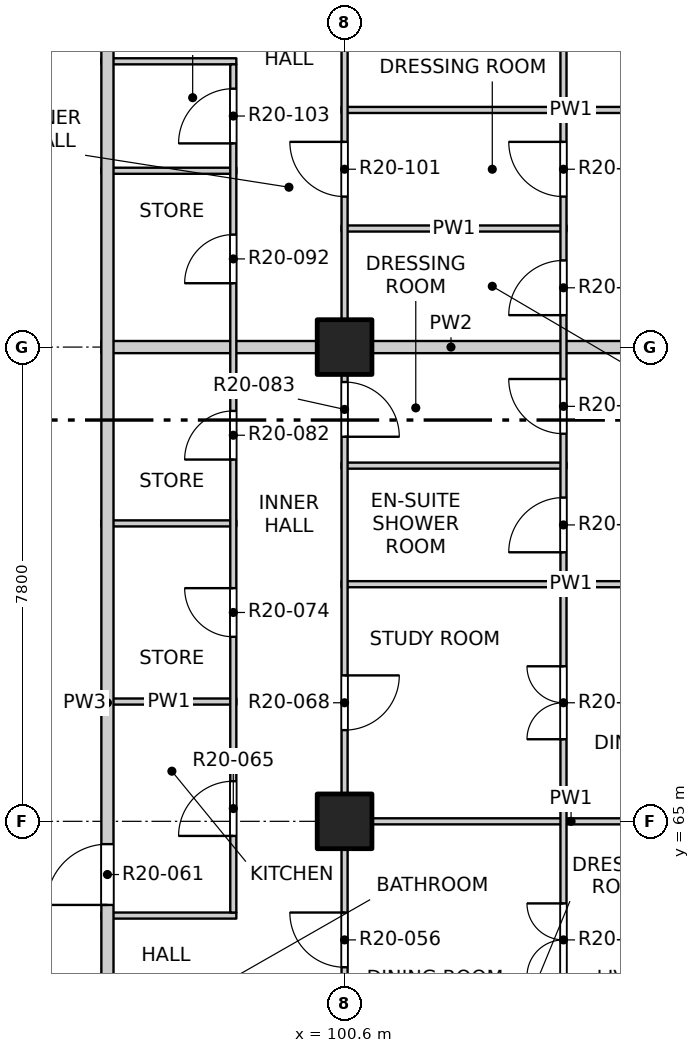
"""IFC4 building model, lengths in metres.
Left out: names, types, materials, properties, quantities, classifications, styles, units other than length and angle.
Written with IfcOpenShell. Run it as: python <this file> out.ifc"""

import sys

from ifc_helpers import new_model, si_unit, direction, frame, frame_2d, origin, origin_2d, place, context, subcontext, project, spatial, rectangle, extrude, element, fill, save


model = new_model("IFC4")
c1 = context("Model", 3, precision=1e-05, world=origin(), true_north=direction((0.0, 1.0)))
c2 = subcontext(c1, "Body", "Model", "MODEL_VIEW")
j1 = project(units=[si_unit("LENGTHUNIT", "METRE"), si_unit("PLANEANGLEUNIT", "RADIAN")], contexts=[c1])
p1 = place(None, origin())
s1 = spatial("IfcSite", under=j1, at=p1, CompositionType="ELEMENT")
p2 = place(p1, origin())
s2 = spatial("IfcBuilding", under=s1, at=p2, CompositionType="ELEMENT")
p3 = place(p2, frame((0.0, 0.0, 210.9)))
s3 = spatial("IfcBuildingStorey", under=s2, at=p3, CompositionType="ELEMENT", Elevation=210.9)
for number, where, z_axis, x_axis in (
    (1, (100.6, 65.0, -0.25), (0.0, 0.0, 1.0), (1.0, 0.0, 0.0)),
    (2, (100.6, 72.8, -0.25), (0.0, 0.0, 1.0), (1.0, 0.0, 0.0)),
):
    element("IfcColumn", number, at=place(p3, frame(where, z_axis=z_axis, x_axis=x_axis)), inside=s3, PredefinedType="COLUMN", context=c2, shape_type="SweptSolid", body=[
        extrude(rectangle(XDim=0.9, YDim=0.9, at=origin_2d()), origin(), (0.0, 0.0, 1.0), 3.4),
    ])
p4 = place(p3, frame((96.6, 63.45, 0.0), z_axis=(0.0, 0.0, 1.0), x_axis=(1.0, 0.0, 0.0)))
e3 = element("IfcWall", 3, at=p4, inside=s3, PredefinedType="PARTITIONING", context=c2, shape_type="SweptSolid", body=[
    extrude(rectangle(XDim=2.22, YDim=0.1, at=frame_2d((1.11, 0.0))), origin(), (0.0, 0.0, 1.0), 3.15),
])
p5 = place(p3, frame((100.55, 65.0, 0.0), z_axis=(0.0, 0.0, 1.0), x_axis=(1.0, 0.0, 0.0)))
e4 = element("IfcWall", 4, at=p5, inside=s3, PredefinedType="PARTITIONING", context=c2, shape_type="SweptSolid", body=[
    extrude(rectangle(XDim=7.55, YDim=0.1, at=frame_2d((3.775, 0.0))), origin(), (0.0, 0.0, 1.0), 3.15),
])
p6 = place(p3, frame((96.6, 66.97, 0.0), z_axis=(0.0, 0.0, 1.0), x_axis=(1.0, 0.0, 0.0)))
e5 = element("IfcWall", 5, at=p6, inside=s3, PredefinedType="PARTITIONING", context=c2, shape_type="SweptSolid", body=[
    extrude(rectangle(XDim=2.22, YDim=0.1, at=frame_2d((1.11, 0.0))), origin(), (0.0, 0.0, 1.0), 3.15),
])
p7 = place(p3, frame((100.55, 68.9, 0.0), z_axis=(0.0, 0.0, 1.0), x_axis=(1.0, 0.0, 0.0)))
e6 = element("IfcWall", 6, at=p7, inside=s3, PredefinedType="PARTITIONING", context=c2, shape_type="SweptSolid", body=[
    extrude(rectangle(XDim=7.55, YDim=0.1, at=frame_2d((3.775, 0.0))), origin(), (0.0, 0.0, 1.0), 2.55),
])
p8 = place(p3, frame((96.6, 69.9, 0.0), z_axis=(0.0, 0.0, 1.0), x_axis=(1.0, 0.0, 0.0)))
e7 = element("IfcWall", 7, at=p8, inside=s3, PredefinedType="PARTITIONING", context=c2, shape_type="SweptSolid", body=[
    extrude(rectangle(XDim=2.22, YDim=0.1, at=frame_2d((1.11, 0.0))), origin(), (0.0, 0.0, 1.0), 3.15),
])
p9 = place(p3, frame((100.55, 70.85, 0.0), z_axis=(0.0, 0.0, 1.0), x_axis=(1.0, 0.0, 0.0)))
e8 = element("IfcWall", 8, at=p9, inside=s3, PredefinedType="PARTITIONING", context=c2, shape_type="SweptSolid", body=[
    extrude(rectangle(XDim=3.7, YDim=0.1, at=frame_2d((1.85, 0.0))), origin(), (0.0, 0.0, 1.0), 3.15),
])
p10 = place(p3, frame((96.6, 72.8, 0.0), z_axis=(0.0, 0.0, 1.0), x_axis=(1.0, 0.0, 0.0)))
e9 = element("IfcWall", 9, at=p10, inside=s3, PredefinedType="PARTITIONING", context=c2, shape_type="SweptSolid", body=[
    extrude(rectangle(XDim=11.5, YDim=0.2, at=frame_2d((5.75, 0.0))), origin(), (0.0, 0.0, 1.0), 3.15),
])
p11 = place(p3, frame((100.55, 74.75, 0.0), z_axis=(0.0, 0.0, 1.0), x_axis=(1.0, 0.0, 0.0)))
e10 = element("IfcWall", 10, at=p11, inside=s3, PredefinedType="PARTITIONING", context=c2, shape_type="SweptSolid", body=[
    extrude(rectangle(XDim=3.7, YDim=0.1, at=frame_2d((1.85, 0.0))), origin(), (0.0, 0.0, 1.0), 3.15),
])
p12 = place(p3, frame((96.6, 75.7, 0.0), z_axis=(0.0, 0.0, 1.0), x_axis=(1.0, 0.0, 0.0)))
e11 = element("IfcWall", 11, at=p12, inside=s3, PredefinedType="PARTITIONING", context=c2, shape_type="SweptSolid", body=[
    extrude(rectangle(XDim=2.22, YDim=0.1, at=frame_2d((1.11, 0.0))), origin(), (0.0, 0.0, 1.0), 3.15),
])
p13 = place(p3, frame((100.55, 76.7, 0.0), z_axis=(0.0, 0.0, 1.0), x_axis=(1.0, 0.0, 0.0)))
e12 = element("IfcWall", 12, at=p13, inside=s3, PredefinedType="PARTITIONING", context=c2, shape_type="SweptSolid", body=[
    extrude(rectangle(XDim=7.55, YDim=0.1, at=frame_2d((3.775, 0.0))), origin(), (0.0, 0.0, 1.0), 2.55),
])
p14 = place(p3, frame((96.6, 77.5, 0.0), z_axis=(0.0, 0.0, 1.0), x_axis=(1.0, 0.0, 0.0)))
e13 = element("IfcWall", 13, at=p14, inside=s3, PredefinedType="PARTITIONING", context=c2, shape_type="SweptSolid", body=[
    extrude(rectangle(XDim=2.22, YDim=0.1, at=frame_2d((1.11, 0.0))), origin(), (0.0, 0.0, 1.0), 3.15),
])
p15 = place(p3, frame((96.7, 49.5, 0.0), z_axis=(0.0, 0.0, 1.0), x_axis=(0.0, 1.0, 0.0)))
e14 = element("IfcWall", 14, at=p15, inside=s3, PredefinedType="PARTITIONING", context=c2, shape_type="SweptSolid", body=[
    extrude(rectangle(XDim=34.9, YDim=0.2, at=frame_2d((17.45, 0.0))), origin(), (0.0, 0.0, 1.0), 3.15),
])
p16 = place(p15, frame((9.625, 0.0, 0.0)))
e15 = element("IfcOpeningElement", 15, at=p16, cuts=e14, PredefinedType="OPENING", context=c2, shape_type="SweptSolid", body=[
    extrude(rectangle(XDim=1.0, YDim=2.1, at=frame_2d((0.5, 1.05))), frame((0.0, 0.11, 0.0), z_axis=(0.0, -1.0, 0.0), x_axis=(1.0, 0.0, 0.0)), (0.0, 0.0, 1.0), 0.22),
])
p17 = place(p15, frame((14.125, 0.0, 0.0)))
e16 = element("IfcOpeningElement", 16, at=p17, cuts=e14, PredefinedType="OPENING", context=c2, shape_type="SweptSolid", body=[
    extrude(rectangle(XDim=1.0, YDim=2.1, at=frame_2d((0.5, 1.05))), frame((0.0, 0.11, 0.0), z_axis=(0.0, -1.0, 0.0), x_axis=(1.0, 0.0, 0.0)), (0.0, 0.0, 1.0), 0.22),
])
p18 = place(p15, frame((29.275, 0.0, 0.0)))
e17 = element("IfcOpeningElement", 17, at=p18, cuts=e14, PredefinedType="OPENING", context=c2, shape_type="SweptSolid", body=[
    extrude(rectangle(XDim=1.0, YDim=2.1, at=frame_2d((0.5, 1.05))), frame((0.0, 0.11, 0.0), z_axis=(0.0, -1.0, 0.0), x_axis=(1.0, 0.0, 0.0)), (0.0, 0.0, 1.0), 0.22),
])
p19 = place(p3, frame((98.77, 63.5, 0.0), z_axis=(0.0, 0.0, 1.0), x_axis=(0.0, 1.0, 0.0)))
e18 = element("IfcWall", 18, at=p19, inside=s3, PredefinedType="PARTITIONING", context=c2, shape_type="SweptSolid", body=[
    extrude(rectangle(XDim=13.95, YDim=0.1, at=frame_2d((6.975, 0.0))), origin(), (0.0, 0.0, 1.0), 3.15),
])
p20 = place(p19, frame((1.26, 0.0, 0.0)))
e19 = element("IfcOpeningElement", 19, at=p20, cuts=e18, PredefinedType="OPENING", context=c2, shape_type="SweptSolid", body=[
    extrude(rectangle(XDim=0.9, YDim=2.1, at=frame_2d((0.45, 1.05))), frame((0.0, 0.06, 0.0), z_axis=(0.0, -1.0, 0.0), x_axis=(1.0, 0.0, 0.0)), (0.0, 0.0, 1.0), 0.12),
])
p21 = place(p19, frame((4.535, 0.0, 0.0)))
e20 = element("IfcOpeningElement", 20, at=p21, cuts=e18, PredefinedType="OPENING", context=c2, shape_type="SweptSolid", body=[
    extrude(rectangle(XDim=0.8, YDim=2.1, at=frame_2d((0.4, 1.05))), frame((0.0, 0.06, 0.0), z_axis=(0.0, -1.0, 0.0), x_axis=(1.0, 0.0, 0.0)), (0.0, 0.0, 1.0), 0.12),
])
p22 = place(p19, frame((7.45, 0.0, 0.0)))
e21 = element("IfcOpeningElement", 21, at=p22, cuts=e18, PredefinedType="OPENING", context=c2, shape_type="SweptSolid", body=[
    extrude(rectangle(XDim=0.8, YDim=2.1, at=frame_2d((0.4, 1.05))), frame((0.0, 0.06, 0.0), z_axis=(0.0, -1.0, 0.0), x_axis=(1.0, 0.0, 0.0)), (0.0, 0.0, 1.0), 0.12),
])
p23 = place(p19, frame((10.35, 0.0, 0.0)))
e22 = element("IfcOpeningElement", 22, at=p23, cuts=e18, PredefinedType="OPENING", context=c2, shape_type="SweptSolid", body=[
    extrude(rectangle(XDim=0.8, YDim=2.1, at=frame_2d((0.4, 1.05))), frame((0.0, 0.06, 0.0), z_axis=(0.0, -1.0, 0.0), x_axis=(1.0, 0.0, 0.0)), (0.0, 0.0, 1.0), 0.12),
])
p24 = place(p19, frame((12.65, 0.0, 0.0)))
e23 = element("IfcOpeningElement", 23, at=p24, cuts=e18, PredefinedType="OPENING", context=c2, shape_type="SweptSolid", body=[
    extrude(rectangle(XDim=0.9, YDim=2.1, at=frame_2d((0.45, 1.05))), frame((0.0, 0.06, 0.0), z_axis=(0.0, -1.0, 0.0), x_axis=(1.0, 0.0, 0.0)), (0.0, 0.0, 1.0), 0.12),
])
p25 = place(p3, frame((100.6, 41.9, 0.0), z_axis=(0.0, 0.0, 1.0), x_axis=(0.0, 1.0, 0.0)))
e24 = element("IfcWall", 24, at=p25, inside=s3, PredefinedType="PARTITIONING", context=c2, shape_type="SweptSolid", body=[
    extrude(rectangle(XDim=46.2, YDim=0.1, at=frame_2d((23.1, 0.0))), origin(), (0.0, 0.0, 1.0), 3.15),
])
p26 = place(p25, frame((1.2, 0.0, 0.0)))
e25 = element("IfcOpeningElement", 25, at=p26, cuts=e24, PredefinedType="OPENING", context=c2, shape_type="SweptSolid", body=[
    extrude(rectangle(XDim=0.9, YDim=2.1, at=frame_2d((0.45, 1.05))), frame((0.0, 0.06, 0.0), z_axis=(0.0, -1.0, 0.0), x_axis=(1.0, 0.0, 0.0)), (0.0, 0.0, 1.0), 0.12),
])
p27 = place(p25, frame((6.025, 0.0, 0.0)))
e26 = element("IfcOpeningElement", 26, at=p27, cuts=e24, PredefinedType="OPENING", context=c2, shape_type="SweptSolid", body=[
    extrude(rectangle(XDim=0.9, YDim=2.1, at=frame_2d((0.45, 1.05))), frame((0.0, 0.06, 0.0), z_axis=(0.0, -1.0, 0.0), x_axis=(1.0, 0.0, 0.0)), (0.0, 0.0, 1.0), 0.12),
])
p28 = place(p25, frame((9.0, 0.0, 0.0)))
e27 = element("IfcOpeningElement", 27, at=p28, cuts=e24, PredefinedType="OPENING", context=c2, shape_type="SweptSolid", body=[
    extrude(rectangle(XDim=0.9, YDim=2.1, at=frame_2d((0.45, 1.05))), frame((0.0, 0.06, 0.0), z_axis=(0.0, -1.0, 0.0), x_axis=(1.0, 0.0, 0.0)), (0.0, 0.0, 1.0), 0.12),
])
p29 = place(p25, frame((13.85, 0.0, 0.0)))
e28 = element("IfcOpeningElement", 28, at=p29, cuts=e24, PredefinedType="OPENING", context=c2, shape_type="SweptSolid", body=[
    extrude(rectangle(XDim=0.9, YDim=2.1, at=frame_2d((0.45, 1.05))), frame((0.0, 0.06, 0.0), z_axis=(0.0, -1.0, 0.0), x_axis=(1.0, 0.0, 0.0)), (0.0, 0.0, 1.0), 0.12),
])
p30 = place(p25, frame((17.775, 0.0, 0.0)))
e29 = element("IfcOpeningElement", 29, at=p30, cuts=e24, PredefinedType="OPENING", context=c2, shape_type="SweptSolid", body=[
    extrude(rectangle(XDim=0.9, YDim=2.1, at=frame_2d((0.45, 1.05))), frame((0.0, 0.06, 0.0), z_axis=(0.0, -1.0, 0.0), x_axis=(1.0, 0.0, 0.0)), (0.0, 0.0, 1.0), 0.12),
])
p31 = place(p25, frame((20.7, 0.0, 0.0)))
e30 = element("IfcOpeningElement", 30, at=p31, cuts=e24, PredefinedType="OPENING", context=c2, shape_type="SweptSolid", body=[
    extrude(rectangle(XDim=0.9, YDim=2.1, at=frame_2d((0.45, 1.05))), frame((0.0, 0.06, 0.0), z_axis=(0.0, -1.0, 0.0), x_axis=(1.0, 0.0, 0.0)), (0.0, 0.0, 1.0), 0.12),
])
p32 = place(p25, frame((24.6, 0.0, 0.0)))
e31 = element("IfcOpeningElement", 31, at=p32, cuts=e24, PredefinedType="OPENING", context=c2, shape_type="SweptSolid", body=[
    extrude(rectangle(XDim=0.9, YDim=2.1, at=frame_2d((0.45, 1.05))), frame((0.0, 0.06, 0.0), z_axis=(0.0, -1.0, 0.0), x_axis=(1.0, 0.0, 0.0)), (0.0, 0.0, 1.0), 0.12),
])
p33 = place(p25, frame((29.425, 0.0, 0.0)))
e32 = element("IfcOpeningElement", 32, at=p33, cuts=e24, PredefinedType="OPENING", context=c2, shape_type="SweptSolid", body=[
    extrude(rectangle(XDim=0.9, YDim=2.1, at=frame_2d((0.45, 1.05))), frame((0.0, 0.06, 0.0), z_axis=(0.0, -1.0, 0.0), x_axis=(1.0, 0.0, 0.0)), (0.0, 0.0, 1.0), 0.12),
])
p34 = place(p25, frame((33.375, 0.0, 0.0)))
e33 = element("IfcOpeningElement", 33, at=p34, cuts=e24, PredefinedType="OPENING", context=c2, shape_type="SweptSolid", body=[
    extrude(rectangle(XDim=0.9, YDim=2.1, at=frame_2d((0.45, 1.05))), frame((0.0, 0.06, 0.0), z_axis=(0.0, -1.0, 0.0), x_axis=(1.0, 0.0, 0.0)), (0.0, 0.0, 1.0), 0.12),
])
p35 = place(p25, frame((36.3, 0.0, 0.0)))
e34 = element("IfcOpeningElement", 34, at=p35, cuts=e24, PredefinedType="OPENING", context=c2, shape_type="SweptSolid", body=[
    extrude(rectangle(XDim=0.9, YDim=2.1, at=frame_2d((0.45, 1.05))), frame((0.0, 0.06, 0.0), z_axis=(0.0, -1.0, 0.0), x_axis=(1.0, 0.0, 0.0)), (0.0, 0.0, 1.0), 0.12),
])
p36 = place(p25, frame((41.175, 0.0, 0.0)))
e35 = element("IfcOpeningElement", 35, at=p36, cuts=e24, PredefinedType="OPENING", context=c2, shape_type="SweptSolid", body=[
    extrude(rectangle(XDim=0.9, YDim=2.1, at=frame_2d((0.45, 1.05))), frame((0.0, 0.06, 0.0), z_axis=(0.0, -1.0, 0.0), x_axis=(1.0, 0.0, 0.0)), (0.0, 0.0, 1.0), 0.12),
])
p37 = place(p25, frame((44.1, 0.0, 0.0)))
e36 = element("IfcOpeningElement", 36, at=p37, cuts=e24, PredefinedType="OPENING", context=c2, shape_type="SweptSolid", body=[
    extrude(rectangle(XDim=0.9, YDim=2.1, at=frame_2d((0.45, 1.05))), frame((0.0, 0.06, 0.0), z_axis=(0.0, -1.0, 0.0), x_axis=(1.0, 0.0, 0.0)), (0.0, 0.0, 1.0), 0.12),
])
p38 = place(p3, frame((104.2, 61.2, 0.0), z_axis=(0.0, 0.0, 1.0), x_axis=(0.0, 1.0, 0.0)))
e37 = element("IfcWall", 37, at=p38, inside=s3, PredefinedType="PARTITIONING", context=c2, shape_type="SweptSolid", body=[
    extrude(rectangle(XDim=26.9, YDim=0.1, at=frame_2d((13.45, 0.0))), origin(), (0.0, 0.0, 1.0), 3.15),
])
p39 = place(p38, frame((1.25, 0.0, 0.0)))
e38 = element("IfcOpeningElement", 38, at=p39, cuts=e37, PredefinedType="OPENING", context=c2, shape_type="SweptSolid", body=[
    extrude(rectangle(XDim=1.2, YDim=2.1, at=frame_2d((0.6, 1.05))), frame((0.0, 0.06, 0.0), z_axis=(0.0, -1.0, 0.0), x_axis=(1.0, 0.0, 0.0)), (0.0, 0.0, 1.0), 0.12),
])
p40 = place(p38, frame((5.15, 0.0, 0.0)))
e39 = element("IfcOpeningElement", 39, at=p40, cuts=e37, PredefinedType="OPENING", context=c2, shape_type="SweptSolid", body=[
    extrude(rectangle(XDim=1.2, YDim=2.1, at=frame_2d((0.6, 1.05))), frame((0.0, 0.06, 0.0), z_axis=(0.0, -1.0, 0.0), x_axis=(1.0, 0.0, 0.0)), (0.0, 0.0, 1.0), 0.12),
])
p41 = place(p38, frame((8.225, 0.0, 0.0)))
e40 = element("IfcOpeningElement", 40, at=p41, cuts=e37, PredefinedType="OPENING", context=c2, shape_type="SweptSolid", body=[
    extrude(rectangle(XDim=0.9, YDim=2.1, at=frame_2d((0.45, 1.05))), frame((0.0, 0.06, 0.0), z_axis=(0.0, -1.0, 0.0), x_axis=(1.0, 0.0, 0.0)), (0.0, 0.0, 1.0), 0.12),
])
p42 = place(p38, frame((10.175, 0.0, 0.0)))
e41 = element("IfcOpeningElement", 41, at=p42, cuts=e37, PredefinedType="OPENING", context=c2, shape_type="SweptSolid", body=[
    extrude(rectangle(XDim=0.9, YDim=2.1, at=frame_2d((0.45, 1.05))), frame((0.0, 0.06, 0.0), z_axis=(0.0, -1.0, 0.0), x_axis=(1.0, 0.0, 0.0)), (0.0, 0.0, 1.0), 0.12),
])
p43 = place(p38, frame((12.125, 0.0, 0.0)))
e42 = element("IfcOpeningElement", 42, at=p43, cuts=e37, PredefinedType="OPENING", context=c2, shape_type="SweptSolid", body=[
    extrude(rectangle(XDim=0.9, YDim=2.1, at=frame_2d((0.45, 1.05))), frame((0.0, 0.06, 0.0), z_axis=(0.0, -1.0, 0.0), x_axis=(1.0, 0.0, 0.0)), (0.0, 0.0, 1.0), 0.12),
])
p44 = place(p38, frame((14.075, 0.0, 0.0)))
e43 = element("IfcOpeningElement", 43, at=p44, cuts=e37, PredefinedType="OPENING", context=c2, shape_type="SweptSolid", body=[
    extrude(rectangle(XDim=0.9, YDim=2.1, at=frame_2d((0.45, 1.05))), frame((0.0, 0.06, 0.0), z_axis=(0.0, -1.0, 0.0), x_axis=(1.0, 0.0, 0.0)), (0.0, 0.0, 1.0), 0.12),
])
p45 = place(p38, frame((16.85, 0.0, 0.0)))
e44 = element("IfcOpeningElement", 44, at=p45, cuts=e37, PredefinedType="OPENING", context=c2, shape_type="SweptSolid", body=[
    extrude(rectangle(XDim=1.2, YDim=2.1, at=frame_2d((0.6, 1.05))), frame((0.0, 0.06, 0.0), z_axis=(0.0, -1.0, 0.0), x_axis=(1.0, 0.0, 0.0)), (0.0, 0.0, 1.0), 0.12),
])
p46 = place(p38, frame((19.925, 0.0, 0.0)))
e45 = element("IfcOpeningElement", 45, at=p46, cuts=e37, PredefinedType="OPENING", context=c2, shape_type="SweptSolid", body=[
    extrude(rectangle(XDim=0.9, YDim=2.1, at=frame_2d((0.45, 1.05))), frame((0.0, 0.06, 0.0), z_axis=(0.0, -1.0, 0.0), x_axis=(1.0, 0.0, 0.0)), (0.0, 0.0, 1.0), 0.12),
])
p47 = place(p38, frame((21.875, 0.0, 0.0)))
e46 = element("IfcOpeningElement", 46, at=p47, cuts=e37, PredefinedType="OPENING", context=c2, shape_type="SweptSolid", body=[
    extrude(rectangle(XDim=0.9, YDim=2.1, at=frame_2d((0.45, 1.05))), frame((0.0, 0.06, 0.0), z_axis=(0.0, -1.0, 0.0), x_axis=(1.0, 0.0, 0.0)), (0.0, 0.0, 1.0), 0.12),
])
p48 = place(p38, frame((24.65, 0.0, 0.0)))
e47 = element("IfcOpeningElement", 47, at=p48, cuts=e37, PredefinedType="OPENING", context=c2, shape_type="SweptSolid", body=[
    extrude(rectangle(XDim=1.2, YDim=2.1, at=frame_2d((0.6, 1.05))), frame((0.0, 0.06, 0.0), z_axis=(0.0, -1.0, 0.0), x_axis=(1.0, 0.0, 0.0)), (0.0, 0.0, 1.0), 0.12),
])
p49 = place(p31, origin())
e48 = element("IfcDoor", 48, at=p49, inside=s3, OperationType="SINGLE_SWING_RIGHT", PredefinedType="DOOR", context=c2, shape_type="SweptSolid", body=[
    extrude(rectangle(XDim=0.9, YDim=2.1, at=frame_2d((0.45, 1.05))), frame((0.0, 0.025, 0.0), z_axis=(0.0, -1.0, 0.0), x_axis=(1.0, 0.0, 0.0)), (0.0, 0.0, 1.0), 0.05),
])
fill(e30, e48)
p50 = place(p39, origin())
e49 = element("IfcDoor", 49, at=p50, inside=s3, OperationType="DOUBLE_DOOR_SINGLE_SWING", PredefinedType="DOOR", context=c2, shape_type="SweptSolid", body=[
    extrude(rectangle(XDim=1.2, YDim=2.1, at=frame_2d((0.6, 1.05))), frame((0.0, 0.025, 0.0), z_axis=(0.0, -1.0, 0.0), x_axis=(1.0, 0.0, 0.0)), (0.0, 0.0, 1.0), 0.05),
])
fill(e38, e49)
p51 = place(p17, origin())
e50 = element("IfcDoor", 50, at=p51, inside=s3, OperationType="SINGLE_SWING_LEFT", PredefinedType="DOOR", context=c2, shape_type="SweptSolid", body=[
    extrude(rectangle(XDim=1.0, YDim=2.1, at=frame_2d((0.5, 1.05))), frame((0.0, 0.025, 0.0), z_axis=(0.0, -1.0, 0.0), x_axis=(1.0, 0.0, 0.0)), (0.0, 0.0, 1.0), 0.05),
])
fill(e16, e50)
p52 = place(p20, origin())
e51 = element("IfcDoor", 51, at=p52, inside=s3, OperationType="SINGLE_SWING_LEFT", PredefinedType="DOOR", context=c2, shape_type="SweptSolid", body=[
    extrude(rectangle(XDim=0.9, YDim=2.1, at=frame_2d((0.45, 1.05))), frame((0.0, 0.025, 0.0), z_axis=(0.0, -1.0, 0.0), x_axis=(1.0, 0.0, 0.0)), (0.0, 0.0, 1.0), 0.05),
])
fill(e19, e51)
p53 = place(p32, origin())
e52 = element("IfcDoor", 52, at=p53, inside=s3, OperationType="SINGLE_SWING_LEFT", PredefinedType="DOOR", context=c2, shape_type="SweptSolid", body=[
    extrude(rectangle(XDim=0.9, YDim=2.1, at=frame_2d((0.45, 1.05))), frame((0.0, 0.025, 0.0), z_axis=(0.0, -1.0, 0.0), x_axis=(1.0, 0.0, 0.0)), (0.0, 0.0, 1.0), 0.05),
])
fill(e31, e52)
p54 = place(p40, origin())
e53 = element("IfcDoor", 53, at=p54, inside=s3, OperationType="DOUBLE_DOOR_SINGLE_SWING", PredefinedType="DOOR", context=c2, shape_type="SweptSolid", body=[
    extrude(rectangle(XDim=1.2, YDim=2.1, at=frame_2d((0.6, 1.05))), frame((0.0, 0.025, 0.0), z_axis=(0.0, -1.0, 0.0), x_axis=(1.0, 0.0, 0.0)), (0.0, 0.0, 1.0), 0.05),
])
fill(e39, e53)
p55 = place(p21, origin())
e54 = element("IfcDoor", 54, at=p55, inside=s3, OperationType="SINGLE_SWING_RIGHT", PredefinedType="DOOR", context=c2, shape_type="SweptSolid", body=[
    extrude(rectangle(XDim=0.8, YDim=2.1, at=frame_2d((0.4, 1.05))), frame((0.0, 0.025, 0.0), z_axis=(0.0, -1.0, 0.0), x_axis=(1.0, 0.0, 0.0)), (0.0, 0.0, 1.0), 0.05),
])
fill(e20, e54)
p56 = place(p41, origin())
e55 = element("IfcDoor", 55, at=p56, inside=s3, OperationType="SINGLE_SWING_LEFT", PredefinedType="DOOR", context=c2, shape_type="SweptSolid", body=[
    extrude(rectangle(XDim=0.9, YDim=2.1, at=frame_2d((0.45, 1.05))), frame((0.0, 0.025, 0.0), z_axis=(0.0, -1.0, 0.0), x_axis=(1.0, 0.0, 0.0)), (0.0, 0.0, 1.0), 0.05),
])
fill(e40, e55)
p57 = place(p22, origin())
e56 = element("IfcDoor", 56, at=p57, inside=s3, OperationType="SINGLE_SWING_LEFT", PredefinedType="DOOR", context=c2, shape_type="SweptSolid", body=[
    extrude(rectangle(XDim=0.8, YDim=2.1, at=frame_2d((0.4, 1.05))), frame((0.0, 0.025, 0.0), z_axis=(0.0, -1.0, 0.0), x_axis=(1.0, 0.0, 0.0)), (0.0, 0.0, 1.0), 0.05),
])
fill(e21, e56)
p58 = place(p33, origin())
e57 = element("IfcDoor", 57, at=p58, inside=s3, OperationType="SINGLE_SWING_RIGHT", PredefinedType="DOOR", context=c2, shape_type="SweptSolid", body=[
    extrude(rectangle(XDim=0.9, YDim=2.1, at=frame_2d((0.45, 1.05))), frame((0.0, 0.025, 0.0), z_axis=(0.0, -1.0, 0.0), x_axis=(1.0, 0.0, 0.0)), (0.0, 0.0, 1.0), 0.05),
])
fill(e32, e57)
p59 = place(p42, origin())
e58 = element("IfcDoor", 58, at=p59, inside=s3, OperationType="SINGLE_SWING_RIGHT", PredefinedType="DOOR", context=c2, shape_type="SweptSolid", body=[
    extrude(rectangle(XDim=0.9, YDim=2.1, at=frame_2d((0.45, 1.05))), frame((0.0, 0.025, 0.0), z_axis=(0.0, -1.0, 0.0), x_axis=(1.0, 0.0, 0.0)), (0.0, 0.0, 1.0), 0.05),
])
fill(e41, e58)
p60 = place(p43, origin())
e59 = element("IfcDoor", 59, at=p60, inside=s3, OperationType="SINGLE_SWING_LEFT", PredefinedType="DOOR", context=c2, shape_type="SweptSolid", body=[
    extrude(rectangle(XDim=0.9, YDim=2.1, at=frame_2d((0.45, 1.05))), frame((0.0, 0.025, 0.0), z_axis=(0.0, -1.0, 0.0), x_axis=(1.0, 0.0, 0.0)), (0.0, 0.0, 1.0), 0.05),
])
fill(e42, e59)
p61 = place(p23, origin())
e60 = element("IfcDoor", 60, at=p61, inside=s3, OperationType="SINGLE_SWING_LEFT", PredefinedType="DOOR", context=c2, shape_type="SweptSolid", body=[
    extrude(rectangle(XDim=0.8, YDim=2.1, at=frame_2d((0.4, 1.05))), frame((0.0, 0.025, 0.0), z_axis=(0.0, -1.0, 0.0), x_axis=(1.0, 0.0, 0.0)), (0.0, 0.0, 1.0), 0.05),
])
fill(e22, e60)
p62 = place(p34, origin())
e61 = element("IfcDoor", 61, at=p62, inside=s3, OperationType="SINGLE_SWING_RIGHT", PredefinedType="DOOR", context=c2, shape_type="SweptSolid", body=[
    extrude(rectangle(XDim=0.9, YDim=2.1, at=frame_2d((0.45, 1.05))), frame((0.0, 0.025, 0.0), z_axis=(0.0, -1.0, 0.0), x_axis=(1.0, 0.0, 0.0)), (0.0, 0.0, 1.0), 0.05),
])
fill(e33, e61)
p63 = place(p44, origin())
e62 = element("IfcDoor", 62, at=p63, inside=s3, OperationType="SINGLE_SWING_RIGHT", PredefinedType="DOOR", context=c2, shape_type="SweptSolid", body=[
    extrude(rectangle(XDim=0.9, YDim=2.1, at=frame_2d((0.45, 1.05))), frame((0.0, 0.025, 0.0), z_axis=(0.0, -1.0, 0.0), x_axis=(1.0, 0.0, 0.0)), (0.0, 0.0, 1.0), 0.05),
])
fill(e43, e62)
p64 = place(p24, origin())
e63 = element("IfcDoor", 63, at=p64, inside=s3, OperationType="SINGLE_SWING_LEFT", PredefinedType="DOOR", context=c2, shape_type="SweptSolid", body=[
    extrude(rectangle(XDim=0.9, YDim=2.1, at=frame_2d((0.45, 1.05))), frame((0.0, 0.025, 0.0), z_axis=(0.0, -1.0, 0.0), x_axis=(1.0, 0.0, 0.0)), (0.0, 0.0, 1.0), 0.05),
])
fill(e23, e63)
save(model, sys.argv[1])
